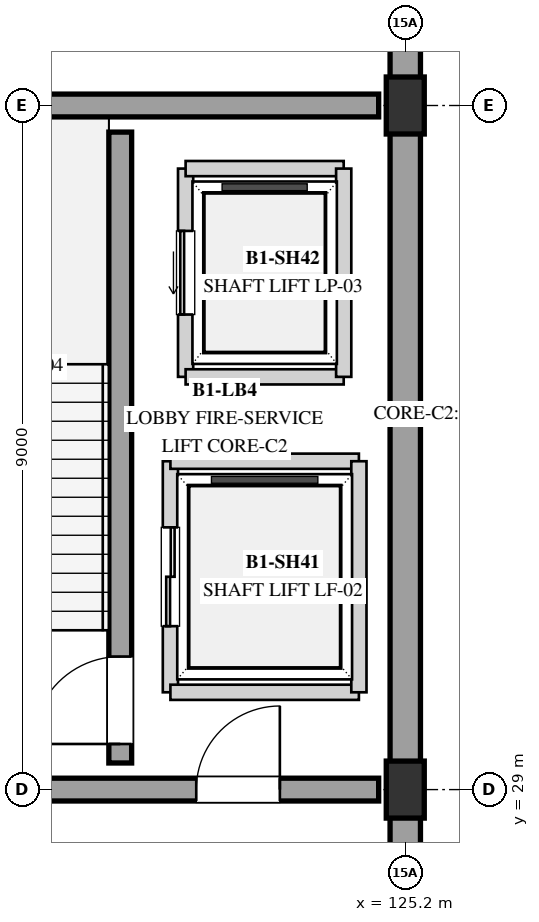
"""IFC4 building model, lengths in metres.
Left out: names, types, materials, properties, quantities, classifications, styles, units other than length and angle.
Written with IfcOpenShell. Run it as: python <this file> out.ifc"""

import sys

from ifc_helpers import new_model, si_unit, direction, frame, frame_2d, origin, origin_2d, place, context, subcontext, project, spatial, rectangle, extrude, element, fill, save


model = new_model("IFC4")
c1 = context("Model", 3, precision=1e-05, world=origin(), true_north=direction((0.0, 1.0)))
c2 = subcontext(c1, "Body", "Model", "MODEL_VIEW")
j1 = project(units=[si_unit("LENGTHUNIT", "METRE"), si_unit("PLANEANGLEUNIT", "RADIAN")], contexts=[c1])
p1 = place(None, origin())
s1 = spatial("IfcSite", under=j1, at=p1, CompositionType="ELEMENT")
p2 = place(p1, origin())
s2 = spatial("IfcBuilding", under=s1, at=p2, CompositionType="ELEMENT")
p3 = place(p2, frame((0.0, 0.0, -4.2)))
s3 = spatial("IfcBuildingStorey", under=s2, at=p3, CompositionType="ELEMENT", Elevation=-4.2)
for number, where, z_axis, x_axis in (
    (1, (125.2, 29.0, 0.0), (0.0, 0.0, 1.0), (1.0, 0.0, 0.0)),
    (2, (125.2, 38.0, 0.0), (0.0, 0.0, 1.0), (1.0, 0.0, 0.0)),
):
    element("IfcColumn", number, at=place(p3, frame(where, z_axis=z_axis, x_axis=x_axis)), inside=s3, PredefinedType="COLUMN", context=c2, shape_type="SweptSolid", body=[
        extrude(rectangle(XDim=0.5, YDim=0.75, at=origin_2d()), origin(), (0.0, 0.0, 1.0), 4.2),
    ])
p4 = place(p3, frame((125.2, 20.0, 0.0), z_axis=(0.0, 0.0, 1.0), x_axis=(0.0, 1.0, 0.0)))
e3 = element("IfcWall", 3, at=p4, inside=s3, PredefinedType="USERDEFINED", context=c2, shape_type="SweptSolid", body=[
    extrude(rectangle(XDim=9.0, YDim=0.4, at=frame_2d((4.5, 0.0))), origin(), (0.0, 0.0, 1.0), 3.82),
])
for number, where, z_axis, x_axis in (
    (4, (125.2, 29.0, 0.0), (0.0, 0.0, 1.0), (0.0, 1.0, 0.0)),
    (5, (125.2, 38.0, 0.0), (0.0, 0.0, 1.0), (0.0, 1.0, 0.0)),
):
    element("IfcWall", number, at=place(p3, frame(where, z_axis=z_axis, x_axis=x_axis)), inside=s3, PredefinedType="USERDEFINED", context=c2, shape_type="SweptSolid", body=[
        extrude(rectangle(XDim=9.0, YDim=0.4, at=frame_2d((4.5, 0.0))), origin(), (0.0, 0.0, 1.0), 3.86),
    ])
p5 = place(p3, frame((121.45, 29.35, 0.0), z_axis=(0.0, 0.0, 1.0), x_axis=(0.0, 1.0, 0.0)))
e6 = element("IfcWall", 6, at=p5, inside=s3, PredefinedType="SHEAR", context=c2, shape_type="SweptSolid", body=[
    extrude(rectangle(XDim=8.3, YDim=0.3, at=frame_2d((4.15, 0.0))), origin(), (0.0, 0.0, 1.0), 3.82),
])
p6 = place(p5, frame((0.25, 0.0, 0.0)))
e7 = element("IfcOpeningElement", 7, at=p6, cuts=e6, PredefinedType="OPENING", context=c2, shape_type="SweptSolid", body=[
    extrude(rectangle(XDim=1.15, YDim=2.15, at=frame_2d((0.575, 1.075))), frame((0.0, 0.16, 0.0), z_axis=(0.0, -1.0, 0.0), x_axis=(1.0, 0.0, 0.0)), (0.0, 0.0, 1.0), 0.32),
])
p7 = place(p3, frame((117.35, 29.0, 0.0), z_axis=(0.0, 0.0, 1.0), x_axis=(1.0, 0.0, 0.0)))
e8 = element("IfcWall", 8, at=p7, inside=s3, PredefinedType="SHEAR", context=c2, shape_type="SweptSolid", body=[
    extrude(rectangle(XDim=7.5, YDim=0.3, at=frame_2d((3.75, 0.0))), origin(), (0.0, 0.0, 1.0), 3.82),
])
p8 = place(p7, frame((5.1, 0.0, 0.0)))
e9 = element("IfcOpeningElement", 9, at=p8, cuts=e8, PredefinedType="OPENING", context=c2, shape_type="SweptSolid", body=[
    extrude(rectangle(XDim=1.1, YDim=2.1, at=frame_2d((0.55, 1.05))), frame((0.0, 0.16, 0.0), z_axis=(0.0, -1.0, 0.0), x_axis=(1.0, 0.0, 0.0)), (0.0, 0.0, 1.0), 0.32),
])
p9 = place(p3, frame((117.35, 38.0, 0.0), z_axis=(0.0, 0.0, 1.0), x_axis=(1.0, 0.0, 0.0)))
e10 = element("IfcWall", 10, at=p9, inside=s3, PredefinedType="SHEAR", context=c2, shape_type="SweptSolid", body=[
    extrude(rectangle(XDim=7.5, YDim=0.3, at=frame_2d((3.75, 0.0))), origin(), (0.0, 0.0, 1.0), 3.82),
])
p10 = place(p3, frame((122.11, 30.28, 0.0), z_axis=(0.0, 0.0, 1.0), x_axis=(0.0, 1.0, 0.0)))
e11 = element("IfcWall", 11, at=p10, inside=s3, PredefinedType="SOLIDWALL", context=c2, shape_type="SweptSolid", body=[
    extrude(rectangle(XDim=3.04, YDim=0.2, at=frame_2d((1.52, 0.0))), origin(), (0.0, 0.0, 1.0), 2.85),
])
p11 = place(p10, frame((0.87, 0.0, 0.0)))
e12 = element("IfcOpeningElement", 12, at=p11, cuts=e11, PredefinedType="OPENING", context=c2, shape_type="SweptSolid", body=[
    extrude(rectangle(XDim=1.3, YDim=2.2, at=frame_2d((0.65, 1.1))), frame((0.0, 0.11, 0.0), z_axis=(0.0, -1.0, 0.0), x_axis=(1.0, 0.0, 0.0)), (0.0, 0.0, 1.0), 0.22),
])
for number, where, z_axis, x_axis in (
    (13, (122.11, 30.28, 0.0), (0.0, 0.0, 1.0), (1.0, 0.0, 0.0)),
    (14, (122.11, 33.32, 0.0), (0.0, 0.0, 1.0), (1.0, 0.0, 0.0)),
):
    element("IfcWall", number, at=place(p3, frame(where, z_axis=z_axis, x_axis=x_axis)), inside=s3, PredefinedType="SOLIDWALL", context=c2, shape_type="SweptSolid", body=[
        extrude(rectangle(XDim=2.48, YDim=0.2, at=frame_2d((1.24, 0.0))), origin(), (0.0, 0.0, 1.0), 2.85),
    ])
p12 = place(p3, frame((124.59, 30.28, 0.0), z_axis=(0.0, 0.0, 1.0), x_axis=(0.0, 1.0, 0.0)))
e15 = element("IfcWall", 15, at=p12, inside=s3, PredefinedType="SOLIDWALL", context=c2, shape_type="SweptSolid", body=[
    extrude(rectangle(XDim=3.04, YDim=0.2, at=frame_2d((1.52, 0.0))), origin(), (0.0, 0.0, 1.0), 2.85),
])
p13 = place(p3, frame((122.31, 34.43, 0.0), z_axis=(0.0, 0.0, 1.0), x_axis=(0.0, 1.0, 0.0)))
e16 = element("IfcWall", 16, at=p13, inside=s3, PredefinedType="SOLIDWALL", context=c2, shape_type="SweptSolid", body=[
    extrude(rectangle(XDim=2.74, YDim=0.2, at=frame_2d((1.37, 0.0))), origin(), (0.0, 0.0, 1.0), 2.85),
])
p14 = place(p13, frame((0.82, 0.0, 0.0)))
e17 = element("IfcOpeningElement", 17, at=p14, cuts=e16, PredefinedType="OPENING", context=c2, shape_type="SweptSolid", body=[
    extrude(rectangle(XDim=1.1, YDim=2.1, at=frame_2d((0.55, 1.05))), frame((0.0, 0.11, 0.0), z_axis=(0.0, -1.0, 0.0), x_axis=(1.0, 0.0, 0.0)), (0.0, 0.0, 1.0), 0.22),
])
for number, where, z_axis, x_axis in (
    (18, (122.31, 34.43, 0.0), (0.0, 0.0, 1.0), (1.0, 0.0, 0.0)),
    (19, (122.31, 37.17, 0.0), (0.0, 0.0, 1.0), (1.0, 0.0, 0.0)),
):
    element("IfcWall", number, at=place(p3, frame(where, z_axis=z_axis, x_axis=x_axis)), inside=s3, PredefinedType="SOLIDWALL", context=c2, shape_type="SweptSolid", body=[
        extrude(rectangle(XDim=2.08, YDim=0.2, at=frame_2d((1.04, 0.0))), origin(), (0.0, 0.0, 1.0), 2.85),
    ])
p15 = place(p3, frame((124.39, 34.43, 0.0), z_axis=(0.0, 0.0, 1.0), x_axis=(0.0, 1.0, 0.0)))
e20 = element("IfcWall", 20, at=p15, inside=s3, PredefinedType="SOLIDWALL", context=c2, shape_type="SweptSolid", body=[
    extrude(rectangle(XDim=2.74, YDim=0.2, at=frame_2d((1.37, 0.0))), origin(), (0.0, 0.0, 1.0), 2.85),
])
p16 = place(p6, origin())
e21 = element("IfcDoor", 21, at=p16, inside=s3, OperationType="SINGLE_SWING_LEFT", PredefinedType="DOOR", context=c2, shape_type="SweptSolid", body=[
    extrude(rectangle(XDim=1.15, YDim=2.15, at=frame_2d((0.575, 1.075))), frame((0.0, 0.025, 0.0), z_axis=(0.0, -1.0, 0.0), x_axis=(1.0, 0.0, 0.0)), (0.0, 0.0, 1.0), 0.05),
])
fill(e7, e21)
p17 = place(p8, origin())
e22 = element("IfcDoor", 22, at=p17, inside=s3, OperationType="SINGLE_SWING_RIGHT", PredefinedType="DOOR", context=c2, shape_type="SweptSolid", body=[
    extrude(rectangle(XDim=1.1, YDim=2.1, at=frame_2d((0.55, 1.05))), frame((0.0, 0.025, 0.0), z_axis=(0.0, -1.0, 0.0), x_axis=(1.0, 0.0, 0.0)), (0.0, 0.0, 1.0), 0.05),
])
fill(e9, e22)
p18 = place(p11, origin())
e23 = element("IfcDoor", 23, at=p18, inside=s3, OperationType="DOUBLE_DOOR_SLIDING", PredefinedType="DOOR", context=c2, shape_type="SweptSolid", body=[
    extrude(rectangle(XDim=1.3, YDim=2.2, at=frame_2d((0.65, 1.1))), frame((0.0, 0.025, 0.0), z_axis=(0.0, -1.0, 0.0), x_axis=(1.0, 0.0, 0.0)), (0.0, 0.0, 1.0), 0.05),
])
fill(e12, e23)
p19 = place(p14, origin())
e24 = element("IfcDoor", 24, at=p19, inside=s3, OperationType="SLIDING_TO_LEFT", PredefinedType="DOOR", context=c2, shape_type="SweptSolid", body=[
    extrude(rectangle(XDim=1.1, YDim=2.1, at=frame_2d((0.55, 1.05))), frame((0.0, 0.025, 0.0), z_axis=(0.0, -1.0, 0.0), x_axis=(1.0, 0.0, 0.0)), (0.0, 0.0, 1.0), 0.05),
])
fill(e17, e24)
save(model, sys.argv[1])
